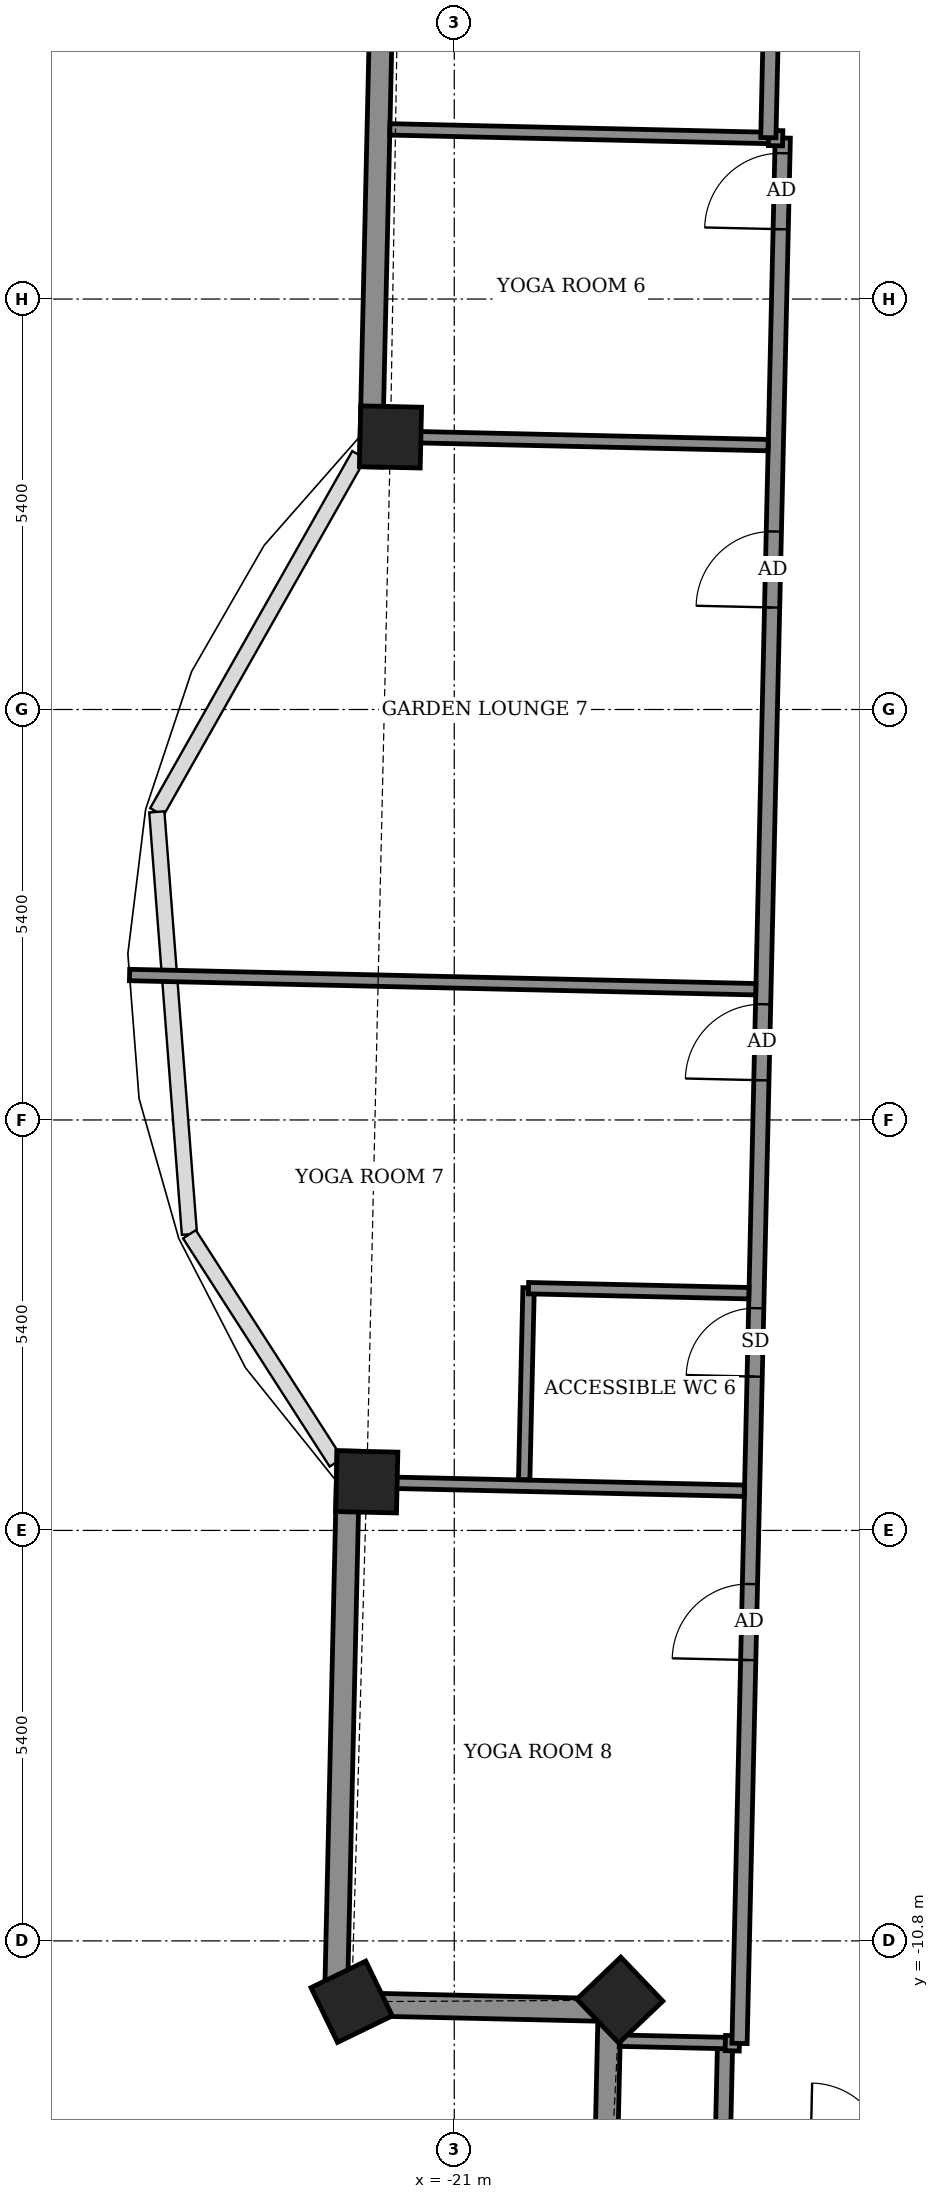
"""IFC4 building model, lengths in metres.
Left out: names, types, materials, properties, quantities, classifications, styles, units other than length and angle.
Written with IfcOpenShell. Run it as: python <this file> out.ifc"""

import sys

from ifc_helpers import new_model, si_unit, direction, frame, frame_2d, origin, origin_2d, place, context, subcontext, project, spatial, rectangle, extrude, element, fill, save


model = new_model("IFC4")
c1 = context("Model", 3, precision=1e-05, world=origin(), true_north=direction((0.0, 1.0)))
c2 = subcontext(c1, "Body", "Model", "MODEL_VIEW")
j1 = project(units=[si_unit("LENGTHUNIT", "METRE"), si_unit("PLANEANGLEUNIT", "RADIAN")], contexts=[c1])
p1 = place(None, origin())
s1 = spatial("IfcSite", under=j1, at=p1, CompositionType="ELEMENT")
p2 = place(p1, origin())
s2 = spatial("IfcBuilding", under=s1, at=p2, CompositionType="ELEMENT")
p3 = place(p2, frame((0.0, 0.0, 350.7)))
s3 = spatial("IfcBuildingStorey", under=s2, at=p3, CompositionType="ELEMENT", Elevation=350.7)
for number, where, z_axis, x_axis in (
    (1, (-22.151, -4.761, -0.55), (0.0, 0.0, 1.0), (-0.023, -1.0, 0.0)),
    (2, (-22.35, -11.601, -0.55), (0.0, 0.0, 1.0), (0.436, -0.9, 0.0)),
    (3, (-18.822, -11.58, -0.55), (0.0, 0.0, 1.0), (0.691, -0.723, 0.0)),
    (4, (-21.839, 8.986, -0.55), (0.0, 0.0, 1.0), (-0.023, -1.0, 0.0)),
):
    element("IfcColumn", number, at=place(p3, frame(where, z_axis=z_axis, x_axis=x_axis)), inside=s3, PredefinedType="COLUMN", context=c2, shape_type="SweptSolid", body=[
        extrude(rectangle(XDim=0.8, YDim=0.8, at=origin_2d()), origin(), (0.0, 0.0, 1.0), 3.6),
    ])
p4 = place(p3, frame((-21.933, 15.865, 0.0), z_axis=(0.0, 0.0, 1.0), x_axis=(-0.022652795902, -0.999743392495, 0.0)))
e5 = element("IfcWall", 5, at=p4, inside=s3, PredefinedType="SOLIDWALL", context=c2, shape_type="SweptSolid", body=[
    extrude(rectangle(XDim=7.275, YDim=0.3, at=frame_2d((3.637, 0.0))), origin(), (0.0, 0.0, 1.0), 2.55),
])
p5 = place(p3, frame((-22.392, -4.356, 0.0), z_axis=(0.0, 0.0, 1.0), x_axis=(-0.022655836414, -0.999743323597, 0.0)))
e6 = element("IfcWall", 6, at=p5, inside=s3, PredefinedType="SOLIDWALL", context=c2, shape_type="SweptSolid", body=[
    extrude(rectangle(XDim=7.274, YDim=0.3, at=frame_2d((3.637, 0.0))), origin(), (0.0, 0.0, 1.0), 2.55),
])
p6 = place(p3, frame((-22.557, -11.628, 0.0), z_axis=(0.0, 0.0, 1.0), x_axis=(0.999740327787, -0.022787650101, 0.0)))
e7 = element("IfcWall", 7, at=p6, inside=s3, PredefinedType="SOLIDWALL", context=c2, shape_type="SweptSolid", body=[
    extrude(rectangle(XDim=3.6, YDim=0.3, at=frame_2d((1.8, 0.0))), origin(), (0.0, 0.0, 1.0), 2.55),
])
p7 = place(p3, frame((-18.958, -11.71, 0.0), z_axis=(0.0, 0.0, 1.0), x_axis=(-0.022514980321, -0.999746505701, 0.0)))
e8 = element("IfcWall", 8, at=p7, inside=s3, PredefinedType="SOLIDWALL", context=c2, shape_type="SweptSolid", body=[
    extrude(rectangle(XDim=3.6, YDim=0.3, at=frame_2d((1.8, 0.0))), origin(), (0.0, 0.0, 1.0), 2.55),
])
p8 = place(p3, frame((-17.471, -13.644, 0.0), z_axis=(0.0, 0.0, 1.0), x_axis=(0.022617910375, 0.999744182344, 0.0)))
e9 = element("IfcWall", 9, at=p8, inside=s3, PredefinedType="PARTITIONING", context=c2, shape_type="SweptSolid", body=[
    extrude(rectangle(XDim=1.5, YDim=0.2, at=frame_2d((0.75, 0.0))), origin(), (0.0, 0.0, 1.0), 3.05),
])
p9 = place(p3, frame((-18.817, -12.113, 0.0), z_axis=(0.0, 0.0, 1.0), x_axis=(0.999750215708, -0.022349635169, 0.0)))
e10 = element("IfcWall", 10, at=p9, inside=s3, PredefinedType="PARTITIONING", context=c2, shape_type="SweptSolid", body=[
    extrude(rectangle(XDim=1.387, YDim=0.15, at=frame_2d((0.694, 0.0))), origin(), (0.0, 0.0, 1.0), 2.55),
])
p10 = place(p3, frame((-17.434, -12.144, 0.0), z_axis=(0.0, 0.0, 1.0), x_axis=(0.999655732728, -0.026237683274, 0.0)))
e11 = element("IfcWall", 11, at=p10, inside=s3, PredefinedType="PARTITIONING", context=c2, shape_type="SweptSolid", body=[
    extrude(rectangle(XDim=0.186, YDim=0.2, at=frame_2d((0.093, 0.0))), origin(), (0.0, 0.0, 1.0), 3.05),
])
p11 = place(p3, frame((-17.247, -12.149, 0.0), z_axis=(0.0, 0.0, 1.0), x_axis=(0.022696191528, 0.999742408268, 0.0)))
e12 = element("IfcWall", 12, at=p11, inside=s3, PredefinedType="PARTITIONING", context=c2, shape_type="SweptSolid", body=[
    extrude(rectangle(XDim=25.074, YDim=0.2, at=frame_2d((12.537, 0.0))), origin(), (0.0, 0.0, 1.0), 3.05),
])
p12 = place(p11, frame((23.874, 0.0, 0.0)))
e13 = element("IfcOpeningElement", 13, at=p12, cuts=e12, PredefinedType="OPENING", context=c2, shape_type="SweptSolid", body=[
    extrude(rectangle(XDim=1.0, YDim=2.1, at=frame_2d((0.5, 1.05))), frame((0.0, 0.11, 0.0), z_axis=(0.0, -1.0, 0.0), x_axis=(1.0, 0.0, 0.0)), (0.0, 0.0, 1.0), 0.22),
])
p13 = place(p11, frame((18.896, 0.0, 0.0)))
e14 = element("IfcOpeningElement", 14, at=p13, cuts=e12, PredefinedType="OPENING", context=c2, shape_type="SweptSolid", body=[
    extrude(rectangle(XDim=1.0, YDim=2.1, at=frame_2d((0.5, 1.05))), frame((0.0, 0.11, 0.0), z_axis=(0.0, -1.0, 0.0), x_axis=(1.0, 0.0, 0.0)), (0.0, 0.0, 1.0), 0.22),
])
p14 = place(p11, frame((12.675, 0.0, 0.0)))
e15 = element("IfcOpeningElement", 15, at=p14, cuts=e12, PredefinedType="OPENING", context=c2, shape_type="SweptSolid", body=[
    extrude(rectangle(XDim=1.0, YDim=2.1, at=frame_2d((0.5, 1.05))), frame((0.0, 0.11, 0.0), z_axis=(0.0, -1.0, 0.0), x_axis=(1.0, 0.0, 0.0)), (0.0, 0.0, 1.0), 0.22),
])
p15 = place(p11, frame((8.775, 0.0, 0.0)))
e16 = element("IfcOpeningElement", 16, at=p15, cuts=e12, PredefinedType="OPENING", context=c2, shape_type="SweptSolid", body=[
    extrude(rectangle(XDim=0.9, YDim=2.1, at=frame_2d((0.45, 1.05))), frame((0.0, 0.11, 0.0), z_axis=(0.0, -1.0, 0.0), x_axis=(1.0, 0.0, 0.0)), (0.0, 0.0, 1.0), 0.22),
])
p16 = place(p11, frame((5.045, 0.0, 0.0)))
e17 = element("IfcOpeningElement", 17, at=p16, cuts=e12, PredefinedType="OPENING", context=c2, shape_type="SweptSolid", body=[
    extrude(rectangle(XDim=1.0, YDim=2.1, at=frame_2d((0.5, 1.05))), frame((0.0, 0.11, 0.0), z_axis=(0.0, -1.0, 0.0), x_axis=(1.0, 0.0, 0.0)), (0.0, 0.0, 1.0), 0.22),
])
p17 = place(p3, frame((-22.251, -4.763, 0.0), z_axis=(0.0, 0.0, 1.0), x_axis=(0.999742680233, -0.022684208613, 0.0)))
e18 = element("IfcWall", 18, at=p17, inside=s3, PredefinedType="PARTITIONING", context=c2, shape_type="SweptSolid", body=[
    extrude(rectangle(XDim=5.069, YDim=0.15, at=frame_2d((2.535, 0.0))), origin(), (0.0, 0.0, 1.0), 3.05),
])
p18 = place(p3, frame((-20.08, -4.732, 0.0), z_axis=(0.0, 0.0, 1.0), x_axis=(0.023015762656, 0.999735102249, 0.0)))
e19 = element("IfcWall", 19, at=p18, inside=s3, PredefinedType="PARTITIONING", context=c2, shape_type="SweptSolid", body=[
    extrude(rectangle(XDim=2.525, YDim=0.15, at=frame_2d((1.262, 0.0))), origin(), (0.0, 0.0, 1.0), 3.05),
])
p19 = place(p3, frame((-20.023, -2.213, 0.0), z_axis=(0.0, 0.0, 1.0), x_axis=(0.999739657619, -0.022817032779, 0.0)))
e20 = element("IfcWall", 20, at=p19, inside=s3, PredefinedType="PARTITIONING", context=c2, shape_type="SweptSolid", body=[
    extrude(rectangle(XDim=2.9, YDim=0.15, at=frame_2d((1.45, 0.0))), origin(), (0.0, 0.0, 1.0), 3.05),
])
p20 = place(p3, frame((-25.272, 1.907, 0.0), z_axis=(0.0, 0.0, 1.0), x_axis=(0.999742492772, -0.022692468944, 0.0)))
e21 = element("IfcWall", 21, at=p20, inside=s3, PredefinedType="PARTITIONING", context=c2, shape_type="SweptSolid", body=[
    extrude(rectangle(XDim=8.241, YDim=0.15, at=frame_2d((4.121, 0.0))), origin(), (0.0, 0.0, 1.0), 2.05),
])
p21 = place(p3, frame((-21.939, 8.993, 0.0), z_axis=(0.0, 0.0, 1.0), x_axis=(0.999742680233, -0.022684208613, 0.0)))
e22 = element("IfcWall", 22, at=p21, inside=s3, PredefinedType="PARTITIONING", context=c2, shape_type="SweptSolid", body=[
    extrude(rectangle(XDim=5.069, YDim=0.15, at=frame_2d((2.535, 0.0))), origin(), (0.0, 0.0, 1.0), 3.05),
])
p22 = place(p3, frame((-21.847, 13.032, 0.0), z_axis=(0.0, 0.0, 1.0), x_axis=(0.99974309766, -0.022665804241, 0.0)))
e23 = element("IfcWall", 23, at=p22, inside=s3, PredefinedType="PARTITIONING", context=c2, shape_type="SweptSolid", body=[
    extrude(rectangle(XDim=4.987, YDim=0.15, at=frame_2d((2.494, 0.0))), origin(), (0.0, 0.0, 1.0), 2.55),
])
p23 = place(p3, frame((-16.865, 12.919, 0.0), z_axis=(0.0, 0.0, 1.0), x_axis=(0.999779627982, -0.020992748094, 0.0)))
e24 = element("IfcWall", 24, at=p23, inside=s3, PredefinedType="PARTITIONING", context=c2, shape_type="SweptSolid", body=[
    extrude(rectangle(XDim=0.186, YDim=0.2, at=frame_2d((0.093, 0.0))), origin(), (0.0, 0.0, 1.0), 3.05),
])
p24 = place(p3, frame((-16.868, 12.923, 0.0), z_axis=(0.0, 0.0, 1.0), x_axis=(0.022617910375, 0.999744182344, 0.0)))
e25 = element("IfcWall", 25, at=p24, inside=s3, PredefinedType="PARTITIONING", context=c2, shape_type="SweptSolid", body=[
    extrude(rectangle(XDim=1.5, YDim=0.2, at=frame_2d((0.75, 0.0))), origin(), (0.0, 0.0, 1.0), 3.05),
])
p25 = place(p3, frame((-16.831, 14.419, 0.0), z_axis=(0.0, 0.0, 1.0), x_axis=(0.999742531431, -0.022690765715, 0.0)))
e26 = element("IfcWall", 26, at=p25, inside=s3, PredefinedType="PARTITIONING", context=c2, shape_type="SweptSolid", body=[
    extrude(rectangle(XDim=38.734, YDim=0.2, at=frame_2d((19.367, 0.0))), origin(), (0.0, 0.0, 1.0), 3.05),
])
p26 = place(p25, frame((35.977, 0.0, 0.0)))
e27 = element("IfcOpeningElement", 27, at=p26, cuts=e26, PredefinedType="OPENING", context=c2, shape_type="SweptSolid", body=[
    extrude(rectangle(XDim=1.0, YDim=2.1, at=frame_2d((0.5, 1.05))), frame((0.0, 0.11, 0.0), z_axis=(0.0, -1.0, 0.0), x_axis=(1.0, 0.0, 0.0)), (0.0, 0.0, 1.0), 0.22),
])
p27 = place(p25, frame((33.167, 0.0, 0.0)))
e28 = element("IfcOpeningElement", 28, at=p27, cuts=e26, PredefinedType="OPENING", context=c2, shape_type="SweptSolid", body=[
    extrude(rectangle(XDim=0.9, YDim=2.1, at=frame_2d((0.45, 1.05))), frame((0.0, 0.11, 0.0), z_axis=(0.0, -1.0, 0.0), x_axis=(1.0, 0.0, 0.0)), (0.0, 0.0, 1.0), 0.22),
])
p28 = place(p25, frame((28.467, 0.0, 0.0)))
e29 = element("IfcOpeningElement", 29, at=p28, cuts=e26, PredefinedType="OPENING", context=c2, shape_type="SweptSolid", body=[
    extrude(rectangle(XDim=1.0, YDim=2.1, at=frame_2d((0.5, 1.05))), frame((0.0, 0.11, 0.0), z_axis=(0.0, -1.0, 0.0), x_axis=(1.0, 0.0, 0.0)), (0.0, 0.0, 1.0), 0.22),
])
p29 = place(p25, frame((30.767, 0.0, 0.0)))
e30 = element("IfcOpeningElement", 30, at=p29, cuts=e26, PredefinedType="OPENING", context=c2, shape_type="SweptSolid", body=[
    extrude(rectangle(XDim=0.9, YDim=2.1, at=frame_2d((0.45, 1.05))), frame((0.0, 0.11, 0.0), z_axis=(0.0, -1.0, 0.0), x_axis=(1.0, 0.0, 0.0)), (0.0, 0.0, 1.0), 0.22),
])
p30 = place(p25, frame((23.541, 0.0, 0.0)))
e31 = element("IfcOpeningElement", 31, at=p30, cuts=e26, PredefinedType="OPENING", context=c2, shape_type="SweptSolid", body=[
    extrude(rectangle(XDim=1.0, YDim=2.1, at=frame_2d((0.5, 1.05))), frame((0.0, 0.11, 0.0), z_axis=(0.0, -1.0, 0.0), x_axis=(1.0, 0.0, 0.0)), (0.0, 0.0, 1.0), 0.22),
])
p31 = place(p25, frame((15.828, 0.0, 0.0)))
e32 = element("IfcOpeningElement", 32, at=p31, cuts=e26, PredefinedType="OPENING", context=c2, shape_type="SweptSolid", body=[
    extrude(rectangle(XDim=1.0, YDim=2.1, at=frame_2d((0.5, 1.05))), frame((0.0, 0.11, 0.0), z_axis=(0.0, -1.0, 0.0), x_axis=(1.0, 0.0, 0.0)), (0.0, 0.0, 1.0), 0.22),
])
p32 = place(p25, frame((19.967, 0.0, 0.0)))
e33 = element("IfcOpeningElement", 33, at=p32, cuts=e26, PredefinedType="OPENING", context=c2, shape_type="SweptSolid", body=[
    extrude(rectangle(XDim=0.9, YDim=2.1, at=frame_2d((0.45, 1.05))), frame((0.0, 0.11, 0.0), z_axis=(0.0, -1.0, 0.0), x_axis=(1.0, 0.0, 0.0)), (0.0, 0.0, 1.0), 0.22),
])
p33 = place(p25, frame((9.83, 0.0, 0.0)))
e34 = element("IfcOpeningElement", 34, at=p33, cuts=e26, PredefinedType="OPENING", context=c2, shape_type="SweptSolid", body=[
    extrude(rectangle(XDim=1.0, YDim=2.1, at=frame_2d((0.5, 1.05))), frame((0.0, 0.11, 0.0), z_axis=(0.0, -1.0, 0.0), x_axis=(1.0, 0.0, 0.0)), (0.0, 0.0, 1.0), 0.22),
])
p34 = place(p25, frame((6.817, 0.0, 0.0)))
e35 = element("IfcOpeningElement", 35, at=p34, cuts=e26, PredefinedType="OPENING", context=c2, shape_type="SweptSolid", body=[
    extrude(rectangle(XDim=0.9, YDim=2.1, at=frame_2d((0.45, 1.05))), frame((0.0, 0.11, 0.0), z_axis=(0.0, -1.0, 0.0), x_axis=(1.0, 0.0, 0.0)), (0.0, 0.0, 1.0), 0.22),
])
p35 = place(p25, frame((0.2, 0.0, 0.0)))
e36 = element("IfcOpeningElement", 36, at=p35, cuts=e26, PredefinedType="OPENING", context=c2, shape_type="SweptSolid", body=[
    extrude(rectangle(XDim=1.0, YDim=2.1, at=frame_2d((0.5, 1.05))), frame((0.0, 0.11, 0.0), z_axis=(0.0, -1.0, 0.0), x_axis=(1.0, 0.0, 0.0)), (0.0, 0.0, 1.0), 0.22),
])
p36 = place(p25, frame((4.217, 0.0, 0.0)))
e37 = element("IfcOpeningElement", 37, at=p36, cuts=e26, PredefinedType="OPENING", context=c2, shape_type="SweptSolid", body=[
    extrude(rectangle(XDim=0.9, YDim=2.1, at=frame_2d((0.45, 1.05))), frame((0.0, 0.11, 0.0), z_axis=(0.0, -1.0, 0.0), x_axis=(1.0, 0.0, 0.0)), (0.0, 0.0, 1.0), 0.22),
])
p37 = place(p12, origin())
e38 = element("IfcDoor", 38, at=p37, inside=s3, OperationType="SINGLE_SWING_RIGHT", PredefinedType="DOOR", context=c2, shape_type="SweptSolid", body=[
    extrude(rectangle(XDim=1.0, YDim=2.1, at=frame_2d((0.5, 1.05))), frame((0.0, 0.025, 0.0), z_axis=(0.0, -1.0, 0.0), x_axis=(1.0, 0.0, 0.0)), (0.0, 0.0, 1.0), 0.05),
])
fill(e13, e38)
p38 = place(p13, origin())
e39 = element("IfcDoor", 39, at=p38, inside=s3, OperationType="SINGLE_SWING_LEFT", PredefinedType="DOOR", context=c2, shape_type="SweptSolid", body=[
    extrude(rectangle(XDim=1.0, YDim=2.1, at=frame_2d((0.5, 1.05))), frame((0.0, 0.025, 0.0), z_axis=(0.0, -1.0, 0.0), x_axis=(1.0, 0.0, 0.0)), (0.0, 0.0, 1.0), 0.05),
])
fill(e14, e39)
p39 = place(p14, origin())
e40 = element("IfcDoor", 40, at=p39, inside=s3, OperationType="SINGLE_SWING_RIGHT", PredefinedType="DOOR", context=c2, shape_type="SweptSolid", body=[
    extrude(rectangle(XDim=1.0, YDim=2.1, at=frame_2d((0.5, 1.05))), frame((0.0, 0.025, 0.0), z_axis=(0.0, -1.0, 0.0), x_axis=(1.0, 0.0, 0.0)), (0.0, 0.0, 1.0), 0.05),
])
fill(e15, e40)
p40 = place(p15, origin())
e41 = element("IfcDoor", 41, at=p40, inside=s3, OperationType="SINGLE_SWING_RIGHT", PredefinedType="DOOR", context=c2, shape_type="SweptSolid", body=[
    extrude(rectangle(XDim=0.9, YDim=2.1, at=frame_2d((0.45, 1.05))), frame((0.0, 0.025, 0.0), z_axis=(0.0, -1.0, 0.0), x_axis=(1.0, 0.0, 0.0)), (0.0, 0.0, 1.0), 0.05),
])
fill(e16, e41)
p41 = place(p16, origin())
e42 = element("IfcDoor", 42, at=p41, inside=s3, OperationType="SINGLE_SWING_LEFT", PredefinedType="DOOR", context=c2, shape_type="SweptSolid", body=[
    extrude(rectangle(XDim=1.0, YDim=2.1, at=frame_2d((0.5, 1.05))), frame((0.0, 0.025, 0.0), z_axis=(0.0, -1.0, 0.0), x_axis=(1.0, 0.0, 0.0)), (0.0, 0.0, 1.0), 0.05),
])
fill(e17, e42)
save(model, sys.argv[1])
